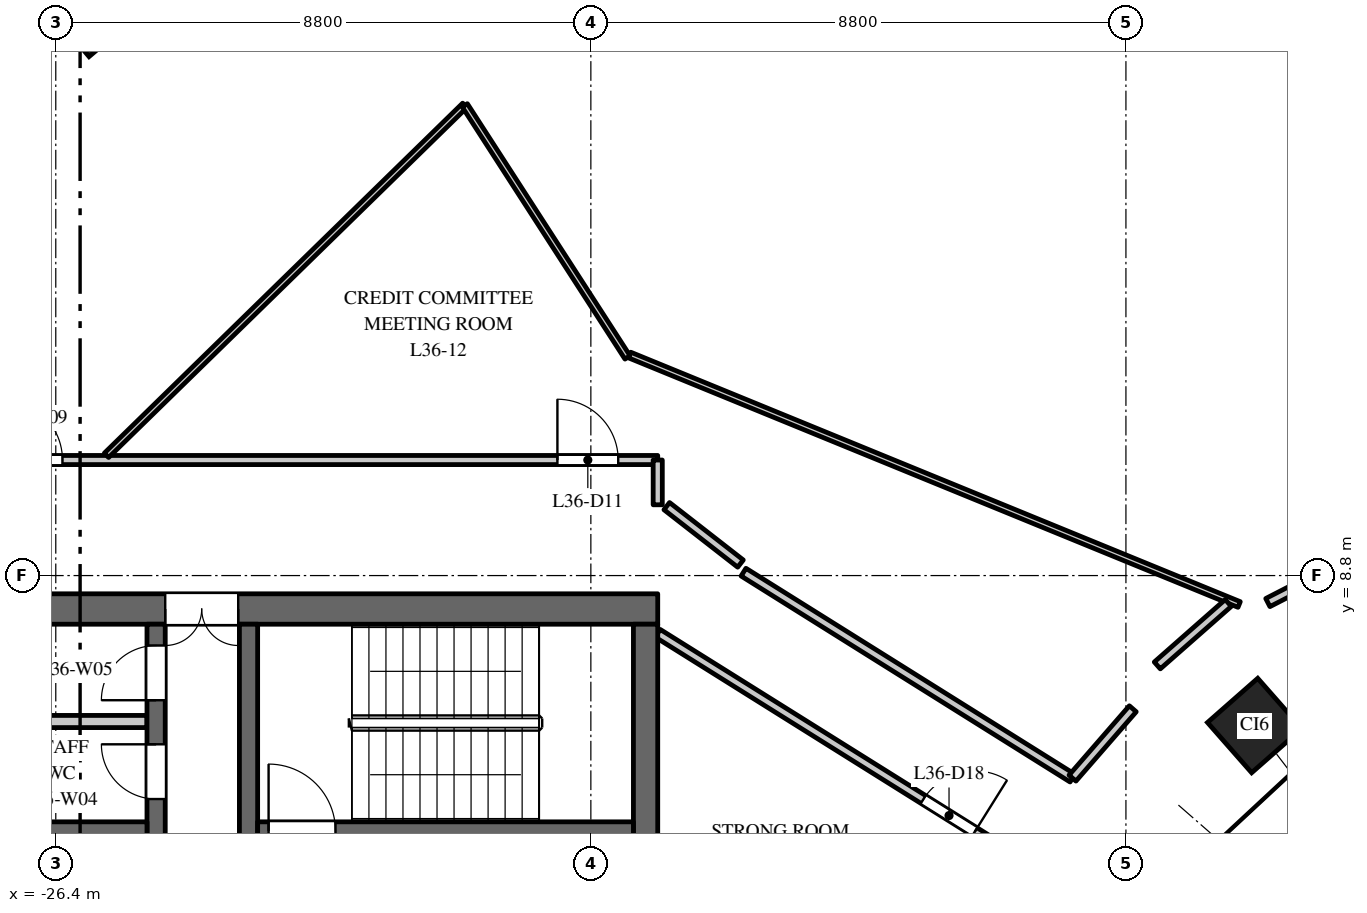
"""IFC4 building model, lengths in metres.
Left out: names, types, materials, properties, quantities, classifications, styles, units other than length and angle.
Written with IfcOpenShell. Run it as: python <this file> out.ifc"""

import sys

from ifc_helpers import new_model, si_unit, direction, frame, frame_2d, origin, origin_2d, place, context, subcontext, project, spatial, rectangle, extrude, element, fill, save


model = new_model("IFC4")
c1 = context("Model", 3, precision=1e-05, world=origin(), true_north=direction((0.0, 1.0)))
c2 = subcontext(c1, "Body", "Model", "MODEL_VIEW")
j1 = project(units=[si_unit("LENGTHUNIT", "METRE"), si_unit("PLANEANGLEUNIT", "RADIAN")], contexts=[c1])
p1 = place(None, origin())
s1 = spatial("IfcSite", under=j1, at=p1, CompositionType="ELEMENT")
p2 = place(p1, origin())
s2 = spatial("IfcBuilding", under=s1, at=p2, CompositionType="ELEMENT")
p3 = place(p2, frame((0.0, 0.0, 158.0)))
s3 = spatial("IfcBuildingStorey", under=s2, at=p3, CompositionType="ELEMENT", Elevation=158.0)
p4 = place(p3, frame((-25.783, 18.18, 0.0), z_axis=(0.0, 0.0, 1.0), x_axis=(-0.763035199656, -0.646356932419, 0.0)))
e1 = element("IfcColumn", 1, at=p4, inside=s3, PredefinedType="COLUMN", context=c2, shape_type="SweptSolid", body=[
    extrude(rectangle(XDim=1.2, YDim=1.2, at=origin_2d()), origin(), (0.0, 0.0, 1.0), 4.0),
])
p5 = place(p3, frame((-6.682, 6.334, 0.0), z_axis=(0.0, 0.0, 1.0), x_axis=(-0.75102249095, -0.660276622399, 0.0)))
e2 = element("IfcColumn", 2, at=p5, inside=s3, PredefinedType="COLUMN", context=c2, shape_type="SweptSolid", body=[
    extrude(rectangle(XDim=1.1, YDim=1.1, at=origin_2d()), origin(), (0.0, 0.0, 1.0), 4.0),
])
p6 = place(p3, frame((-16.5, 8.25, 0.0), z_axis=(0.0, 0.0, 1.0), x_axis=(-1.0, 0.0, 0.0)))
e3 = element("IfcWall", 3, at=p6, inside=s3, PredefinedType="SHEAR", context=c2, shape_type="SweptSolid", body=[
    extrude(rectangle(XDim=15.0, YDim=0.5, at=frame_2d((7.5, 0.0))), origin(), (0.0, 0.0, 1.0), 3.7),
])
p7 = place(p6, frame((6.9, 0.0, 0.0)))
e4 = element("IfcOpeningElement", 4, at=p7, cuts=e3, PredefinedType="OPENING", context=c2, shape_type="SweptSolid", body=[
    extrude(rectangle(XDim=1.2, YDim=2.1, at=frame_2d((0.6, 1.05))), frame((0.0, 0.26, 0.0), z_axis=(0.0, -1.0, 0.0), x_axis=(1.0, 0.0, 0.0)), (0.0, 0.0, 1.0), 0.52),
])
p8 = place(p6, frame((12.275, 0.0, 0.0)))
e5 = element("IfcOpeningElement", 5, at=p8, cuts=e3, PredefinedType="OPENING", context=c2, shape_type="SweptSolid", body=[
    extrude(rectangle(XDim=0.9, YDim=2.1, at=frame_2d((0.45, 1.05))), frame((0.0, 0.26, 0.0), z_axis=(0.0, -1.0, 0.0), x_axis=(1.0, 0.0, 0.0)), (0.0, 0.0, 1.0), 0.52),
])
p9 = place(p3, frame((-24.75, -8.0, 0.0), z_axis=(0.0, 0.0, 1.0), x_axis=(0.0, 1.0, 0.0)))
e6 = element("IfcWall", 6, at=p9, inside=s3, PredefinedType="SHEAR", context=c2, shape_type="SweptSolid", body=[
    extrude(rectangle(XDim=16.0, YDim=0.3, at=frame_2d((8.0, 0.0))), origin(), (0.0, 0.0, 1.0), 3.7),
])
p10 = place(p9, frame((4.425, 0.0, 0.0)))
e7 = element("IfcOpeningElement", 7, at=p10, cuts=e6, PredefinedType="OPENING", context=c2, shape_type="SweptSolid", body=[
    extrude(rectangle(XDim=1.1, YDim=2.1, at=frame_2d((0.55, 1.05))), frame((0.0, 0.16, 0.0), z_axis=(0.0, -1.0, 0.0), x_axis=(1.0, 0.0, 0.0)), (0.0, 0.0, 1.0), 0.32),
])
p11 = place(p9, frame((7.45, 0.0, 0.0)))
e8 = element("IfcOpeningElement", 8, at=p11, cuts=e6, PredefinedType="OPENING", context=c2, shape_type="SweptSolid", body=[
    extrude(rectangle(XDim=1.1, YDim=2.1, at=frame_2d((0.55, 1.05))), frame((0.0, 0.16, 0.0), z_axis=(0.0, -1.0, 0.0), x_axis=(1.0, 0.0, 0.0)), (0.0, 0.0, 1.0), 0.32),
])
p12 = place(p9, frame((10.475, 0.0, 0.0)))
e9 = element("IfcOpeningElement", 9, at=p12, cuts=e6, PredefinedType="OPENING", context=c2, shape_type="SweptSolid", body=[
    extrude(rectangle(XDim=1.1, YDim=2.1, at=frame_2d((0.55, 1.05))), frame((0.0, 0.16, 0.0), z_axis=(0.0, -1.0, 0.0), x_axis=(1.0, 0.0, 0.0)), (0.0, 0.0, 1.0), 0.32),
])
p13 = place(p9, frame((13.125, 0.0, 0.0)))
e10 = element("IfcOpeningElement", 10, at=p13, cuts=e6, PredefinedType="OPENING", context=c2, shape_type="SweptSolid", body=[
    extrude(rectangle(XDim=0.9, YDim=2.1, at=frame_2d((0.45, 1.05))), frame((0.0, 0.16, 0.0), z_axis=(0.0, -1.0, 0.0), x_axis=(1.0, 0.0, 0.0)), (0.0, 0.0, 1.0), 0.32),
])
p14 = place(p9, frame((14.75, 0.0, 0.0)))
e11 = element("IfcOpeningElement", 11, at=p14, cuts=e6, PredefinedType="OPENING", context=c2, shape_type="SweptSolid", body=[
    extrude(rectangle(XDim=0.9, YDim=2.1, at=frame_2d((0.45, 1.05))), frame((0.0, 0.16, 0.0), z_axis=(0.0, -1.0, 0.0), x_axis=(1.0, 0.0, 0.0)), (0.0, 0.0, 1.0), 0.32),
])
p15 = place(p9, frame((1.35, 0.0, 0.0)))
e12 = element("IfcOpeningElement", 12, at=p15, cuts=e6, PredefinedType="OPENING", context=c2, shape_type="SweptSolid", body=[
    extrude(rectangle(XDim=0.9, YDim=2.1, at=frame_2d((0.45, 1.05))), frame((0.0, 0.16, 0.0), z_axis=(0.0, -1.0, 0.0), x_axis=(1.0, 0.0, 0.0)), (0.0, 0.0, 1.0), 0.32),
])
p16 = place(p3, frame((-16.7, -8.0, 0.0), z_axis=(0.0, 0.0, 1.0), x_axis=(0.0, 1.0, 0.0)))
e13 = element("IfcWall", 13, at=p16, inside=s3, PredefinedType="SHEAR", context=c2, shape_type="SweptSolid", body=[
    extrude(rectangle(XDim=16.0, YDim=0.4, at=frame_2d((8.0, 0.0))), origin(), (0.0, 0.0, 1.0), 3.7),
])
p17 = place(p3, frame((-24.9, 4.6, 0.0), z_axis=(0.0, 0.0, 1.0), x_axis=(-1.0, 0.0, 0.0)))
e14 = element("IfcWall", 14, at=p17, inside=s3, PredefinedType="SHEAR", context=c2, shape_type="SweptSolid", body=[
    extrude(rectangle(XDim=6.1, YDim=0.3, at=frame_2d((3.05, 0.0))), origin(), (0.0, 0.0, 1.0), 3.7),
])
p18 = place(p17, frame((4.2, 0.0, 0.0)))
e15 = element("IfcOpeningElement", 15, at=p18, cuts=e14, PredefinedType="OPENING", context=c2, shape_type="SweptSolid", body=[
    extrude(rectangle(XDim=0.9, YDim=2.1, at=frame_2d((0.45, 1.05))), frame((0.0, 0.16, 0.0), z_axis=(0.0, -1.0, 0.0), x_axis=(1.0, 0.0, 0.0)), (0.0, 0.0, 1.0), 0.32),
])
p19 = place(p3, frame((-24.9, 6.4, 0.0), z_axis=(0.0, 0.0, 1.0), x_axis=(-1.0, 0.0, 0.0)))
e16 = element("IfcWall", 16, at=p19, inside=s3, PredefinedType="PARTITIONING", context=c2, shape_type="SweptSolid", body=[
    extrude(rectangle(XDim=2.35, YDim=0.2, at=frame_2d((1.175, 0.0))), origin(), (0.0, 0.0, 1.0), 3.7),
])
p20 = place(p3, frame((-23.23, 2.25, 0.0), z_axis=(0.0, 0.0, 1.0), x_axis=(0.0, 1.0, 0.0)))
e17 = element("IfcWall", 17, at=p20, inside=s3, PredefinedType="SHEAR", context=c2, shape_type="SweptSolid", body=[
    extrude(rectangle(XDim=5.75, YDim=0.3, at=frame_2d((2.875, 0.0))), origin(), (0.0, 0.0, 1.0), 3.7),
])
p21 = place(p20, frame((0.6, 0.0, 0.0)))
e18 = element("IfcOpeningElement", 18, at=p21, cuts=e17, PredefinedType="OPENING", context=c2, shape_type="SweptSolid", body=[
    extrude(rectangle(XDim=1.0, YDim=2.1, at=frame_2d((0.5, 1.05))), frame((0.0, 0.16, 0.0), z_axis=(0.0, -1.0, 0.0), x_axis=(1.0, 0.0, 0.0)), (0.0, 0.0, 1.0), 0.32),
])
p22 = place(p3, frame((-16.9, 4.6, 0.0), z_axis=(0.0, 0.0, 1.0), x_axis=(-1.0, 0.0, 0.0)))
e19 = element("IfcWall", 19, at=p22, inside=s3, PredefinedType="SHEAR", context=c2, shape_type="SweptSolid", body=[
    extrude(rectangle(XDim=6.18, YDim=0.3, at=frame_2d((3.09, 0.0))), origin(), (0.0, 0.0, 1.0), 3.7),
])
p23 = place(p22, frame((4.9, 0.0, 0.0)))
e20 = element("IfcOpeningElement", 20, at=p23, cuts=e19, PredefinedType="OPENING", context=c2, shape_type="SweptSolid", body=[
    extrude(rectangle(XDim=1.1, YDim=2.1, at=frame_2d((0.55, 1.05))), frame((0.0, 0.16, 0.0), z_axis=(0.0, -1.0, 0.0), x_axis=(1.0, 0.0, 0.0)), (0.0, 0.0, 1.0), 0.32),
])
p24 = place(p3, frame((-31.5, 10.7, 0.0), z_axis=(0.0, 0.0, 1.0), x_axis=(1.0, 0.0, 0.0)))
e21 = element("IfcWall", 21, at=p24, inside=s3, PredefinedType="PARTITIONING", context=c2, shape_type="SweptSolid", body=[
    extrude(rectangle(XDim=15.0, YDim=0.15, at=frame_2d((7.5, 0.0))), origin(), (0.0, 0.0, 1.0), 3.1),
])
p25 = place(p24, frame((4.21, 0.0, 0.0)))
e22 = element("IfcOpeningElement", 22, at=p25, cuts=e21, PredefinedType="OPENING", context=c2, shape_type="SweptSolid", body=[
    extrude(rectangle(XDim=1.0, YDim=2.1, at=frame_2d((0.5, 1.05))), frame((0.0, 0.085, 0.0), z_axis=(0.0, -1.0, 0.0), x_axis=(1.0, 0.0, 0.0)), (0.0, 0.0, 1.0), 0.17),
])
p26 = place(p24, frame((13.35, 0.0, 0.0)))
e23 = element("IfcOpeningElement", 23, at=p26, cuts=e21, PredefinedType="OPENING", context=c2, shape_type="SweptSolid", body=[
    extrude(rectangle(XDim=1.0, YDim=2.1, at=frame_2d((0.5, 1.05))), frame((0.0, 0.085, 0.0), z_axis=(0.0, -1.0, 0.0), x_axis=(1.0, 0.0, 0.0)), (0.0, 0.0, 1.0), 0.17),
])
p27 = place(p3, frame((-25.566, 10.778, 0.0), z_axis=(0.0, 0.0, 1.0), x_axis=(0.715430617602, 0.698683784982, 0.0)))
e24 = element("IfcWall", 24, at=p27, inside=s3, PredefinedType="PARTITIONING", context=c2, shape_type="SweptSolid", body=[
    extrude(rectangle(XDim=8.237, YDim=0.1, at=frame_2d((4.118, 0.0))), origin(), (0.0, 0.0, 1.0), 2.75),
])
p28 = place(p3, frame((-19.673, 16.533, 0.0), z_axis=(0.0, 0.0, 1.0), x_axis=(0.542297022656, -0.840186847801, 0.0)))
e25 = element("IfcWall", 25, at=p28, inside=s3, PredefinedType="PARTITIONING", context=c2, shape_type="SweptSolid", body=[
    extrude(rectangle(XDim=4.935, YDim=0.1, at=frame_2d((2.467, 0.0))), origin(), (0.0, 0.0, 1.0), 3.7),
])
p29 = place(p3, frame((-16.963, 12.427, 0.0), z_axis=(0.0, 0.0, 1.0), x_axis=(0.925484473487, -0.378785545308, 0.0)))
e26 = element("IfcWall", 26, at=p29, inside=s3, PredefinedType="PARTITIONING", context=c2, shape_type="SweptSolid", body=[
    extrude(rectangle(XDim=10.832, YDim=0.1, at=frame_2d((5.416, 0.0))), origin(), (0.0, 0.0, 1.0), 3.7),
])
p30 = place(p3, frame((-16.5, 9.964, 0.0), z_axis=(0.0, 0.0, 1.0), x_axis=(0.0, 1.0, 0.0)))
e27 = element("IfcWall", 27, at=p30, inside=s3, PredefinedType="PARTITIONING", context=c2, shape_type="SweptSolid", body=[
    extrude(rectangle(XDim=0.736, YDim=0.15, at=frame_2d((0.368, 0.0))), origin(), (0.0, 0.0, 1.0), 3.7),
])
p31 = place(p3, frame((-16.5, 7.851, 0.0), z_axis=(0.0, 0.0, 1.0), x_axis=(0.847690706888, -0.530490777917, 0.0)))
e28 = element("IfcWall", 28, at=p31, inside=s3, PredefinedType="PARTITIONING", context=c2, shape_type="SweptSolid", body=[
    extrude(rectangle(XDim=6.781, YDim=0.15, at=frame_2d((3.39, 0.0))), origin(), (0.0, 0.0, 1.0), 3.7),
])
p32 = place(p31, frame((5.151, 0.0, 0.0)))
e29 = element("IfcOpeningElement", 29, at=p32, cuts=e28, PredefinedType="OPENING", context=c2, shape_type="SweptSolid", body=[
    extrude(rectangle(XDim=1.0, YDim=2.1, at=frame_2d((0.5, 1.05))), frame((0.0, 0.085, 0.0), z_axis=(0.0, -1.0, 0.0), x_axis=(1.0, 0.0, 0.0)), (0.0, 0.0, 1.0), 0.17),
])
p33 = place(p3, frame((-15.089, 8.856, 0.0), z_axis=(0.0, 0.0, 1.0), x_axis=(0.847602682855, -0.530631408811, 0.0)))
e30 = element("IfcWall", 30, at=p33, inside=s3, PredefinedType="PARTITIONING", context=c2, shape_type="SweptSolid", body=[
    extrude(rectangle(XDim=6.383, YDim=0.15, at=frame_2d((3.191, 0.0))), origin(), (0.0, 0.0, 1.0), 3.7),
])
p34 = place(p3, frame((-9.679, 5.469, 0.0), z_axis=(0.0, 0.0, 1.0), x_axis=(0.656454677423, 0.75436546613, 0.0)))
e31 = element("IfcWall", 31, at=p34, inside=s3, PredefinedType="PARTITIONING", context=c2, shape_type="SweptSolid", body=[
    extrude(rectangle(XDim=1.511, YDim=0.15, at=frame_2d((0.755, 0.0))), origin(), (0.0, 0.0, 1.0), 2.75),
])
p35 = place(p3, frame((-8.284, 7.322, 0.0), z_axis=(0.0, 0.0, 1.0), x_axis=(0.750666784408, 0.660680996235, 0.0)))
e32 = element("IfcWall", 32, at=p35, inside=s3, PredefinedType="PARTITIONING", context=c2, shape_type="SweptSolid", body=[
    extrude(rectangle(XDim=1.555, YDim=0.15, at=frame_2d((0.777, 0.0))), origin(), (0.0, 0.0, 1.0), 3.7),
])
p36 = place(p3, frame((-6.466, 8.356, 0.0), z_axis=(0.0, 0.0, 1.0), x_axis=(0.889472002788, 0.456989667559, 0.0)))
e33 = element("IfcWall", 33, at=p36, inside=s3, PredefinedType="PARTITIONING", context=c2, shape_type="SweptSolid", body=[
    extrude(rectangle(XDim=1.355, YDim=0.15, at=frame_2d((0.677, 0.0))), origin(), (0.0, 0.0, 1.0), 3.7),
])
p37 = place(p3, frame((-16.352, 9.942, 0.0), z_axis=(0.0, 0.0, 1.0), x_axis=(0.788950226826, -0.614457109643, 0.0)))
e34 = element("IfcWall", 34, at=p37, inside=s3, PredefinedType="PARTITIONING", context=c2, shape_type="SweptSolid", body=[
    extrude(rectangle(XDim=1.538, YDim=0.15, at=frame_2d((0.769, 0.0))), origin(), (0.0, 0.0, 1.0), 3.7),
])
p38 = place(p23, origin())
e35 = element("IfcDoor", 35, at=p38, inside=s3, OperationType="SINGLE_SWING_RIGHT", PredefinedType="DOOR", context=c2, shape_type="SweptSolid", body=[
    extrude(rectangle(XDim=1.1, YDim=2.1, at=frame_2d((0.55, 1.05))), frame((0.0, 0.025, 0.0), z_axis=(0.0, -1.0, 0.0), x_axis=(1.0, 0.0, 0.0)), (0.0, 0.0, 1.0), 0.05),
])
fill(e20, e35)
p39 = place(p7, origin())
e36 = element("IfcDoor", 36, at=p39, inside=s3, OperationType="DOUBLE_DOOR_DOUBLE_SWING", PredefinedType="DOOR", context=c2, shape_type="SweptSolid", body=[
    extrude(rectangle(XDim=1.2, YDim=2.1, at=frame_2d((0.6, 1.05))), frame((0.0, 0.025, 0.0), z_axis=(0.0, -1.0, 0.0), x_axis=(1.0, 0.0, 0.0)), (0.0, 0.0, 1.0), 0.05),
])
fill(e4, e36)
p40 = place(p13, origin())
e37 = element("IfcDoor", 37, at=p40, inside=s3, OperationType="SINGLE_SWING_LEFT", PredefinedType="DOOR", context=c2, shape_type="SweptSolid", body=[
    extrude(rectangle(XDim=0.9, YDim=2.1, at=frame_2d((0.45, 1.05))), frame((0.0, 0.025, 0.0), z_axis=(0.0, -1.0, 0.0), x_axis=(1.0, 0.0, 0.0)), (0.0, 0.0, 1.0), 0.05),
])
fill(e10, e37)
p41 = place(p14, origin())
e38 = element("IfcDoor", 38, at=p41, inside=s3, OperationType="SINGLE_SWING_RIGHT", PredefinedType="DOOR", context=c2, shape_type="SweptSolid", body=[
    extrude(rectangle(XDim=0.9, YDim=2.1, at=frame_2d((0.45, 1.05))), frame((0.0, 0.025, 0.0), z_axis=(0.0, -1.0, 0.0), x_axis=(1.0, 0.0, 0.0)), (0.0, 0.0, 1.0), 0.05),
])
fill(e11, e38)
p42 = place(p25, origin())
e39 = element("IfcDoor", 39, at=p42, inside=s3, OperationType="SINGLE_SWING_LEFT", PredefinedType="DOOR", context=c2, shape_type="SweptSolid", body=[
    extrude(rectangle(XDim=1.0, YDim=2.1, at=frame_2d((0.5, 1.05))), frame((0.0, 0.025, 0.0), z_axis=(0.0, -1.0, 0.0), x_axis=(1.0, 0.0, 0.0)), (0.0, 0.0, 1.0), 0.05),
])
fill(e22, e39)
p43 = place(p26, origin())
e40 = element("IfcDoor", 40, at=p43, inside=s3, OperationType="SINGLE_SWING_LEFT", PredefinedType="DOOR", context=c2, shape_type="SweptSolid", body=[
    extrude(rectangle(XDim=1.0, YDim=2.1, at=frame_2d((0.5, 1.05))), frame((0.0, 0.025, 0.0), z_axis=(0.0, -1.0, 0.0), x_axis=(1.0, 0.0, 0.0)), (0.0, 0.0, 1.0), 0.05),
])
fill(e23, e40)
p44 = place(p32, origin())
e41 = element("IfcDoor", 41, at=p44, inside=s3, OperationType="SINGLE_SWING_RIGHT", PredefinedType="DOOR", context=c2, shape_type="SweptSolid", body=[
    extrude(rectangle(XDim=1.0, YDim=2.1, at=frame_2d((0.5, 1.05))), frame((0.0, 0.025, 0.0), z_axis=(0.0, -1.0, 0.0), x_axis=(1.0, 0.0, 0.0)), (0.0, 0.0, 1.0), 0.05),
])
fill(e29, e41)
save(model, sys.argv[1])
